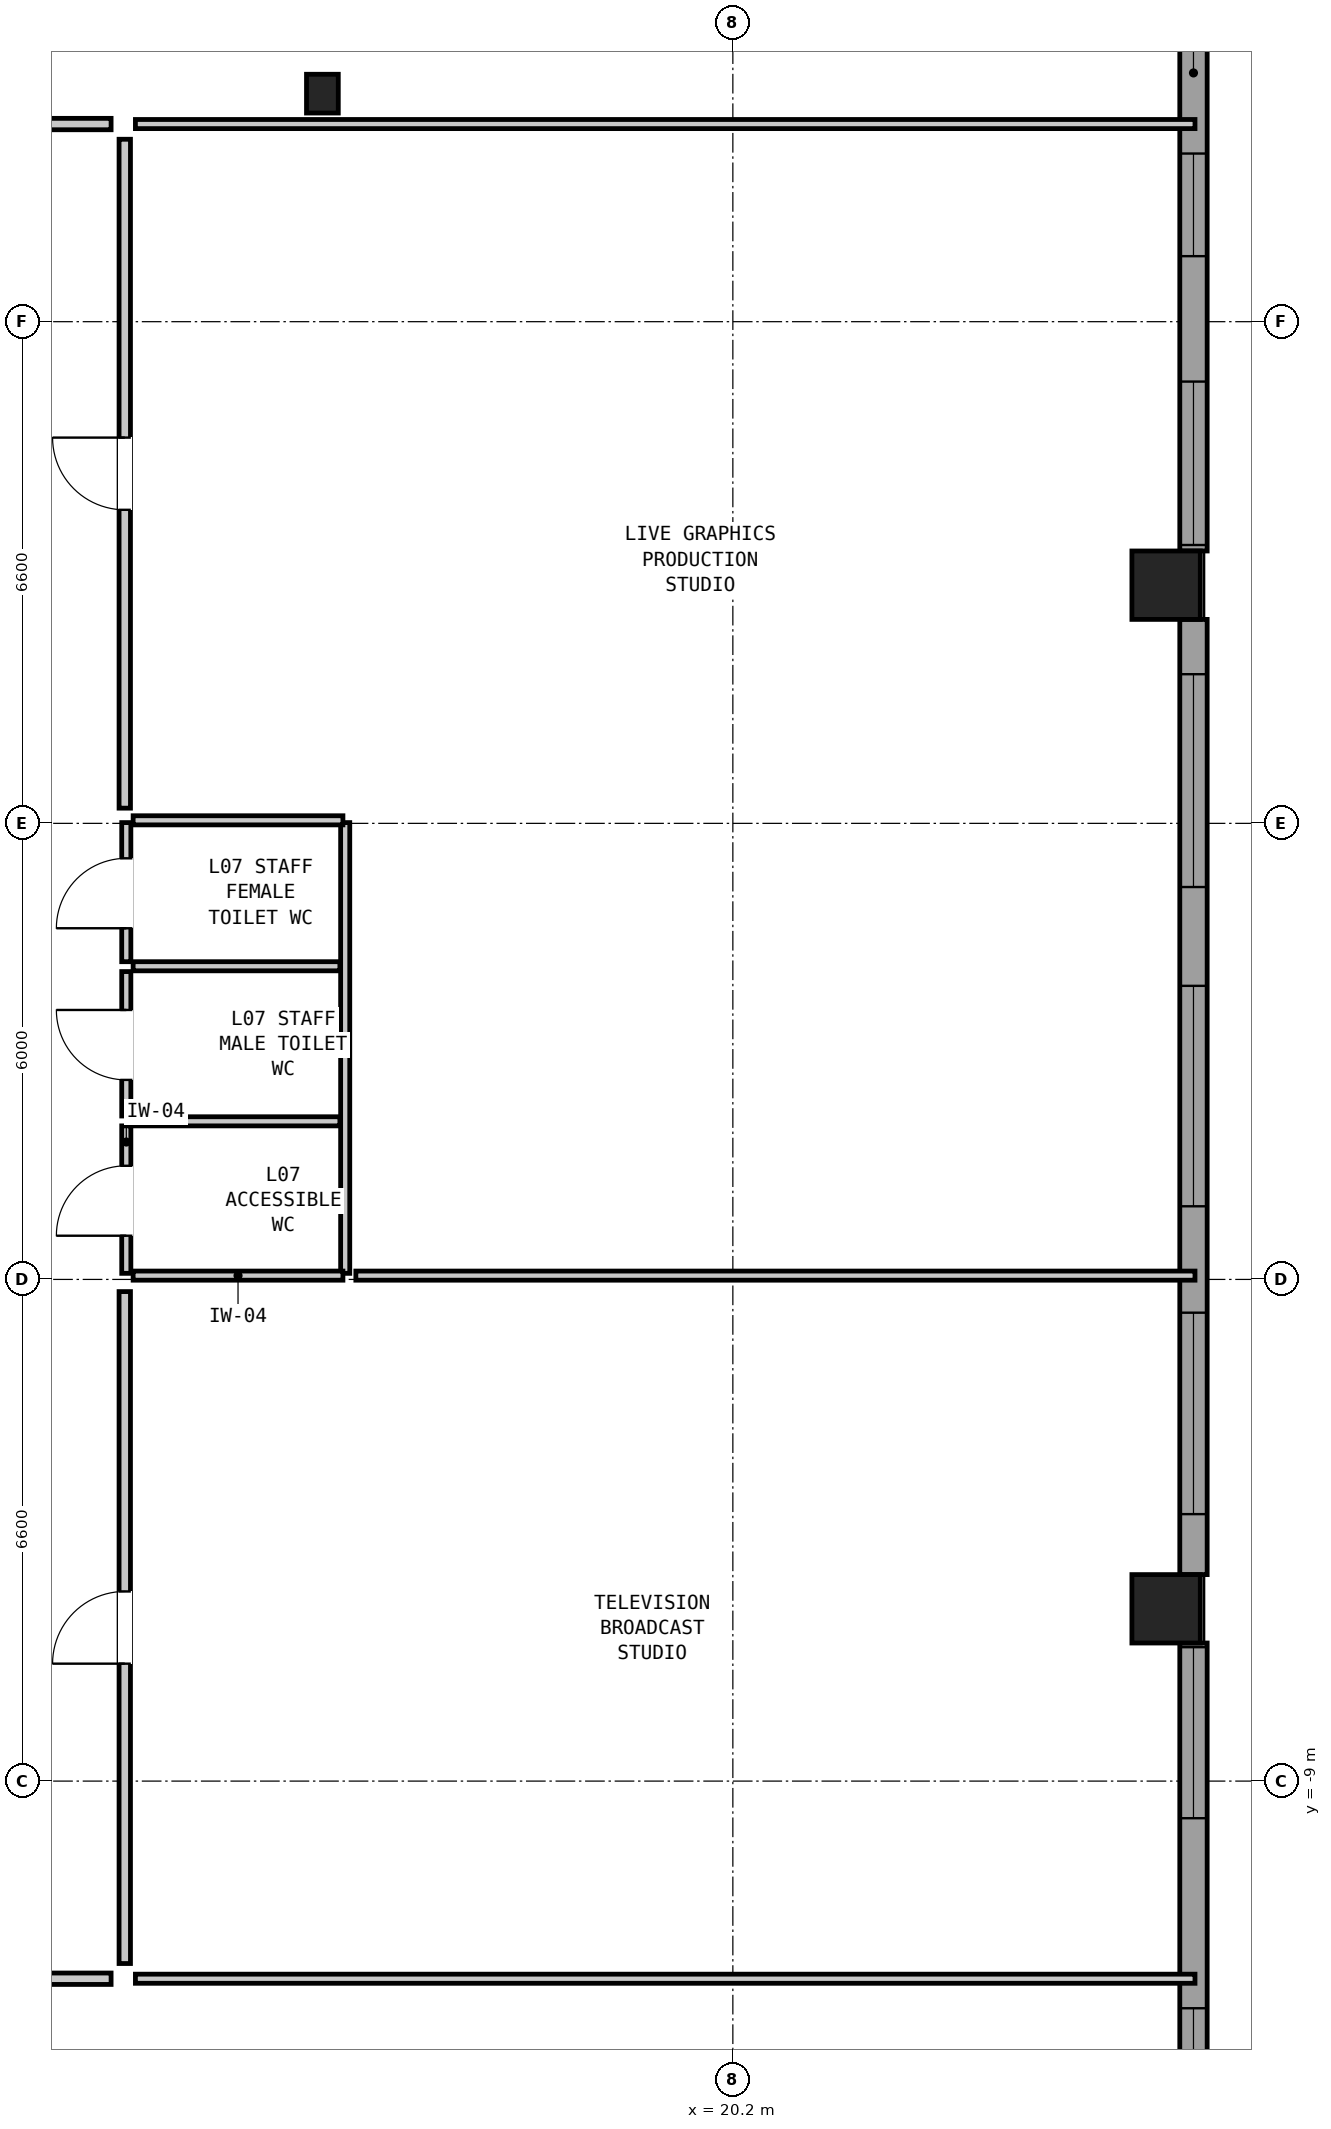
"""IFC4 building model, lengths in metres.
Left out: names, types, materials, properties, quantities, classifications, styles, units other than length and angle.
Written with IfcOpenShell. Run it as: python <this file> out.ifc"""

import sys

from ifc_helpers import new_model, si_unit, direction, frame, frame_2d, origin, origin_2d, place, context, subcontext, project, spatial, rectangle, hollow_rectangle, i_section, extrude, element, fill, save


model = new_model("IFC4")
c1 = context("Model", 3, precision=1e-05, world=origin(), true_north=direction((0.0, 1.0)))
c2 = subcontext(c1, "Body", "Model", "MODEL_VIEW")
j1 = project(units=[si_unit("LENGTHUNIT", "METRE"), si_unit("PLANEANGLEUNIT", "RADIAN")], contexts=[c1])
p1 = place(None, origin())
s1 = spatial("IfcSite", under=j1, at=p1, CompositionType="ELEMENT")
p2 = place(p1, origin())
s2 = spatial("IfcBuilding", under=s1, at=p2, CompositionType="ELEMENT")
p3 = place(p2, frame((0.0, 0.0, 29.15)))
s3 = spatial("IfcBuildingStorey", under=s2, at=p3, CompositionType="ELEMENT", Elevation=29.15)
for number, where, z_axis, x_axis in (
    (1, (25.9, -6.733, 0.0), (0.0, 0.0, 1.0), (0.0, 1.0, 0.0)),
    (2, (25.9, 6.733, 0.0), (0.0, 0.0, 1.0), (0.0, 1.0, 0.0)),
):
    element("IfcColumn", number, at=place(p3, frame(where, z_axis=z_axis, x_axis=x_axis)), inside=s3, PredefinedType="COLUMN", context=c2, shape_type="SweptSolid", body=[
        extrude(hollow_rectangle(XDim=0.9, YDim=0.9, WallThickness=0.055, at=origin_2d()), origin(), (0.0, 0.0, 1.0), 3.05),
    ])
p4 = place(p3, frame((14.8, 13.2, 0.0), z_axis=(0.0, 0.0, 1.0), x_axis=(1.0, 0.0, 0.0)))
e3 = element("IfcColumn", 3, at=p4, inside=s3, PredefinedType="COLUMN", context=c2, shape_type="SweptSolid", body=[
    extrude(i_section(OverallWidth=0.418, OverallDepth=0.51, WebThickness=0.042, FlangeThickness=0.068, at=origin_2d()), origin(), (0.0, 0.0, 1.0), 3.05),
])
p5 = place(p3, frame((26.26, 19.762, 0.0), z_axis=(0.0, 0.0, 1.0), x_axis=(0.0, -1.0, 0.0)))
e4 = element("IfcWall", 4, at=p5, inside=s3, PredefinedType="SOLIDWALL", context=c2, shape_type="SweptSolid", body=[
    extrude(rectangle(XDim=12.579, YDim=0.36, at=frame_2d((6.289, 0.0))), origin(), (0.0, 0.0, 1.0), 2.067),
])
p6 = place(p5, frame((1.8, 0.0, 0.2)))
e5 = element("IfcOpeningElement", 5, at=p6, cuts=e4, PredefinedType="OPENING", context=c2, shape_type="SweptSolid", body=[
    extrude(rectangle(XDim=2.65, YDim=1.05, at=frame_2d((1.325, 0.525))), frame((0.0, 0.192, 0.0), z_axis=(0.0, -1.0, 0.0), x_axis=(1.0, 0.0, 0.0)), (0.0, 0.0, 1.0), 0.384),
])
p7 = place(p5, frame((7.35, 0.0, 0.9)))
e6 = element("IfcOpeningElement", 6, at=p7, cuts=e4, PredefinedType="OPENING", context=c2, shape_type="SweptSolid", body=[
    extrude(rectangle(XDim=1.35, YDim=1.0, at=frame_2d((0.675, 0.5))), frame((0.0, 0.192, 0.0), z_axis=(0.0, -1.0, 0.0), x_axis=(1.0, 0.0, 0.0)), (0.0, 0.0, 1.0), 0.384),
])
p8 = place(p5, frame((10.35, 0.0, 0.2)))
e7 = element("IfcOpeningElement", 7, at=p8, cuts=e4, PredefinedType="OPENING", context=c2, shape_type="SweptSolid", body=[
    extrude(rectangle(XDim=2.15, YDim=1.2, at=frame_2d((1.075, 0.6))), frame((0.0, 0.192, 0.0), z_axis=(0.0, -1.0, 0.0), x_axis=(1.0, 0.0, 0.0)), (0.0, 0.0, 1.0), 0.384),
])
p9 = place(p3, frame((26.26, 6.283, 0.0), z_axis=(0.0, 0.0, 1.0), x_axis=(0.0, -1.0, 0.0)))
e8 = element("IfcWall", 8, at=p9, inside=s3, PredefinedType="SOLIDWALL", context=c2, shape_type="SweptSolid", body=[
    extrude(rectangle(XDim=12.566, YDim=0.36, at=frame_2d((6.283, 0.0))), origin(), (0.0, 0.0, 1.0), 2.067),
])
p10 = place(p9, frame((0.721, 0.0, 0.9)))
e9 = element("IfcOpeningElement", 9, at=p10, cuts=e8, PredefinedType="OPENING", context=c2, shape_type="SweptSolid", body=[
    extrude(rectangle(XDim=2.8, YDim=1.0, at=frame_2d((1.4, 0.5))), frame((0.0, 0.192, 0.0), z_axis=(0.0, -1.0, 0.0), x_axis=(1.0, 0.0, 0.0)), (0.0, 0.0, 1.0), 0.384),
])
p11 = place(p9, frame((4.821, 0.0, 0.2)))
e10 = element("IfcOpeningElement", 10, at=p11, cuts=e8, PredefinedType="OPENING", context=c2, shape_type="SweptSolid", body=[
    extrude(rectangle(XDim=2.9, YDim=0.95, at=frame_2d((1.45, 0.475))), frame((0.0, 0.192, 0.0), z_axis=(0.0, -1.0, 0.0), x_axis=(1.0, 0.0, 0.0)), (0.0, 0.0, 1.0), 0.384),
])
p12 = place(p9, frame((9.121, 0.0, 0.85)))
e11 = element("IfcOpeningElement", 11, at=p12, cuts=e8, PredefinedType="OPENING", context=c2, shape_type="SweptSolid", body=[
    extrude(rectangle(XDim=2.65, YDim=1.05, at=frame_2d((1.325, 0.525))), frame((0.0, 0.192, 0.0), z_axis=(0.0, -1.0, 0.0), x_axis=(1.0, 0.0, 0.0)), (0.0, 0.0, 1.0), 0.384),
])
p13 = place(p3, frame((26.26, -7.183, 0.0), z_axis=(0.0, 0.0, 1.0), x_axis=(0.0, -1.0, 0.0)))
e12 = element("IfcWall", 12, at=p13, inside=s3, PredefinedType="SOLIDWALL", context=c2, shape_type="SweptSolid", body=[
    extrude(rectangle(XDim=12.579, YDim=0.36, at=frame_2d((6.289, 0.0))), origin(), (0.0, 0.0, 1.0), 2.067),
])
p14 = place(p13, frame((0.055, 0.0, 0.2)))
e13 = element("IfcOpeningElement", 13, at=p14, cuts=e12, PredefinedType="OPENING", context=c2, shape_type="SweptSolid", body=[
    extrude(rectangle(XDim=2.25, YDim=1.15, at=frame_2d((1.125, 0.575))), frame((0.0, 0.192, 0.0), z_axis=(0.0, -1.0, 0.0), x_axis=(1.0, 0.0, 0.0)), (0.0, 0.0, 1.0), 0.384),
])
p15 = place(p13, frame((4.805, 0.0, 0.8)))
e14 = element("IfcOpeningElement", 14, at=p15, cuts=e12, PredefinedType="OPENING", context=c2, shape_type="SweptSolid", body=[
    extrude(rectangle(XDim=1.75, YDim=1.1, at=frame_2d((0.875, 0.55))), frame((0.0, 0.192, 0.0), z_axis=(0.0, -1.0, 0.0), x_axis=(1.0, 0.0, 0.0)), (0.0, 0.0, 1.0), 0.384),
])
p16 = place(p13, frame((8.055, 0.0, 0.2)))
e15 = element("IfcOpeningElement", 15, at=p16, cuts=e12, PredefinedType="OPENING", context=c2, shape_type="SweptSolid", body=[
    extrude(rectangle(XDim=2.8, YDim=1.0, at=frame_2d((1.4, 0.5))), frame((0.0, 0.192, 0.0), z_axis=(0.0, -1.0, 0.0), x_axis=(1.0, 0.0, 0.0)), (0.0, 0.0, 1.0), 0.384),
])
p17 = place(p3, frame((12.22, -2.32, 0.0), z_axis=(0.0, 0.0, 1.0), x_axis=(0.0, 1.0, 0.0)))
e16 = element("IfcWall", 16, at=p17, inside=s3, PredefinedType="PARTITIONING", context=c2, shape_type="SweptSolid", body=[
    extrude(rectangle(XDim=1.94, YDim=0.12, at=frame_2d((0.97, 0.0))), origin(), (0.0, 0.0, 1.0), 2.83),
])
p18 = place(p17, frame((0.495, 0.0, 0.0)))
e17 = element("IfcOpeningElement", 17, at=p18, cuts=e16, PredefinedType="OPENING", context=c2, shape_type="SweptSolid", body=[
    extrude(rectangle(XDim=0.92, YDim=2.1, at=frame_2d((0.46, 1.05))), frame((0.0, 0.072, 0.0), z_axis=(0.0, -1.0, 0.0), x_axis=(1.0, 0.0, 0.0)), (0.0, 0.0, 1.0), 0.144),
])
p19 = place(p3, frame((12.22, -0.25, 0.0), z_axis=(0.0, 0.0, 1.0), x_axis=(0.0, 1.0, 0.0)))
e18 = element("IfcWall", 18, at=p19, inside=s3, PredefinedType="PARTITIONING", context=c2, shape_type="SweptSolid", body=[
    extrude(rectangle(XDim=1.9, YDim=0.12, at=frame_2d((0.95, 0.0))), origin(), (0.0, 0.0, 1.0), 2.83),
])
p20 = place(p19, frame((0.475, 0.0, 0.0)))
e19 = element("IfcOpeningElement", 19, at=p20, cuts=e18, PredefinedType="OPENING", context=c2, shape_type="SweptSolid", body=[
    extrude(rectangle(XDim=0.92, YDim=2.1, at=frame_2d((0.46, 1.05))), frame((0.0, 0.072, 0.0), z_axis=(0.0, -1.0, 0.0), x_axis=(1.0, 0.0, 0.0)), (0.0, 0.0, 1.0), 0.144),
])
p21 = place(p3, frame((12.22, 1.78, 0.0), z_axis=(0.0, 0.0, 1.0), x_axis=(0.0, 1.0, 0.0)))
e20 = element("IfcWall", 20, at=p21, inside=s3, PredefinedType="PARTITIONING", context=c2, shape_type="SweptSolid", body=[
    extrude(rectangle(XDim=1.83, YDim=0.12, at=frame_2d((0.915, 0.0))), origin(), (0.0, 0.0, 1.0), 2.83),
])
p22 = place(p21, frame((0.44, 0.0, 0.0)))
e21 = element("IfcOpeningElement", 21, at=p22, cuts=e20, PredefinedType="OPENING", context=c2, shape_type="SweptSolid", body=[
    extrude(rectangle(XDim=0.92, YDim=2.1, at=frame_2d((0.46, 1.05))), frame((0.0, 0.072, 0.0), z_axis=(0.0, -1.0, 0.0), x_axis=(1.0, 0.0, 0.0)), (0.0, 0.0, 1.0), 0.144),
])
p23 = place(p3, frame((15.1, -2.32, 0.0), z_axis=(0.0, 0.0, 1.0), x_axis=(0.0, 1.0, 0.0)))
e22 = element("IfcWall", 22, at=p23, inside=s3, PredefinedType="PARTITIONING", context=c2, shape_type="SweptSolid", body=[
    extrude(rectangle(XDim=5.93, YDim=0.12, at=frame_2d((2.965, 0.0))), origin(), (0.0, 0.0, 1.0), 2.83),
])
for number, where, z_axis, x_axis in (
    (23, (12.31, -2.35, 0.0), (0.0, 0.0, 1.0), (1.0, 0.0, 0.0)),
    (24, (12.31, 3.64, 0.0), (0.0, 0.0, 1.0), (1.0, 0.0, 0.0)),
):
    element("IfcWall", number, at=place(p3, frame(where, z_axis=z_axis, x_axis=x_axis)), inside=s3, PredefinedType="PARTITIONING", context=c2, shape_type="SweptSolid", body=[
        extrude(rectangle(XDim=2.76, YDim=0.12, at=frame_2d((1.38, 0.0))), origin(), (0.0, 0.0, 1.0), 1.799),
    ])
for number, where, z_axis, x_axis in (
    (25, (12.31, -0.32, 0.0), (0.0, 0.0, 1.0), (1.0, 0.0, 0.0)),
    (26, (12.31, 1.72, 0.0), (0.0, 0.0, 1.0), (1.0, 0.0, 0.0)),
):
    element("IfcWall", number, at=place(p3, frame(where, z_axis=z_axis, x_axis=x_axis)), inside=s3, PredefinedType="PARTITIONING", context=c2, shape_type="SweptSolid", body=[
        extrude(rectangle(XDim=2.72, YDim=0.12, at=frame_2d((1.36, 0.0))), origin(), (0.0, 0.0, 1.0), 2.83),
    ])
p24 = place(p3, frame((12.34, 12.8, 0.0), z_axis=(0.0, 0.0, 1.0), x_axis=(1.0, 0.0, 0.0)))
e27 = element("IfcWall", 27, at=p24, inside=s3, PredefinedType="PARTITIONING", context=c2, shape_type="SweptSolid", body=[
    extrude(rectangle(XDim=13.94, YDim=0.12, at=frame_2d((6.97, 0.0))), origin(), (0.0, 0.0, 1.0), 2.83),
])
p25 = place(p3, frame((12.34, -11.6, 0.0), z_axis=(0.0, 0.0, 1.0), x_axis=(1.0, 0.0, 0.0)))
e28 = element("IfcWall", 28, at=p25, inside=s3, PredefinedType="PARTITIONING", context=c2, shape_type="SweptSolid", body=[
    extrude(rectangle(XDim=13.94, YDim=0.12, at=frame_2d((6.97, 0.0))), origin(), (0.0, 0.0, 1.0), 2.274),
])
p26 = place(p3, frame((15.24, -2.35, 0.0), z_axis=(0.0, 0.0, 1.0), x_axis=(1.0, 0.0, 0.0)))
e29 = element("IfcWall", 29, at=p26, inside=s3, PredefinedType="PARTITIONING", context=c2, shape_type="SweptSolid", body=[
    extrude(rectangle(XDim=11.04, YDim=0.12, at=frame_2d((5.52, 0.0))), origin(), (0.0, 0.0, 1.0), 1.799),
])
p27 = place(p3, frame((-3.32, 12.8, 0.0), z_axis=(0.0, 0.0, 1.0), x_axis=(1.0, 0.0, 0.0)))
e30 = element("IfcWall", 30, at=p27, inside=s3, PredefinedType="PARTITIONING", context=c2, shape_type="SweptSolid", body=[
    extrude(rectangle(XDim=15.34, YDim=0.15, at=frame_2d((7.67, 0.0))), origin(), (0.0, 0.0, 1.0), 2.83),
])
p28 = place(p27, frame((7.195, 0.0, 0.0)))
e31 = element("IfcOpeningElement", 31, at=p28, cuts=e30, PredefinedType="OPENING", context=c2, shape_type="SweptSolid", body=[
    extrude(rectangle(XDim=0.95, YDim=2.1, at=frame_2d((0.475, 1.05))), frame((0.0, 0.087, 0.0), z_axis=(0.0, -1.0, 0.0), x_axis=(1.0, 0.0, 0.0)), (0.0, 0.0, 1.0), 0.174),
])
p29 = place(p3, frame((-12.02, -11.6, 0.0), z_axis=(0.0, 0.0, 1.0), x_axis=(1.0, 0.0, 0.0)))
e32 = element("IfcWall", 32, at=p29, inside=s3, PredefinedType="PARTITIONING", context=c2, shape_type="SweptSolid", body=[
    extrude(rectangle(XDim=24.04, YDim=0.15, at=frame_2d((12.02, 0.0))), origin(), (0.0, 0.0, 1.0), 2.274),
])
p30 = place(p29, frame((11.545, 0.0, 0.0)))
e33 = element("IfcOpeningElement", 33, at=p30, cuts=e32, PredefinedType="OPENING", context=c2, shape_type="SweptSolid", body=[
    extrude(rectangle(XDim=0.95, YDim=2.1, at=frame_2d((0.475, 1.05))), frame((0.0, 0.087, 0.0), z_axis=(0.0, -1.0, 0.0), x_axis=(1.0, 0.0, 0.0)), (0.0, 0.0, 1.0), 0.174),
])
p31 = place(p3, frame((12.2, -11.4, 0.0), z_axis=(0.0, 0.0, 1.0), x_axis=(0.0, 1.0, 0.0)))
e34 = element("IfcWall", 34, at=p31, inside=s3, PredefinedType="PARTITIONING", context=c2, shape_type="SweptSolid", body=[
    extrude(rectangle(XDim=8.84, YDim=0.15, at=frame_2d((4.42, 0.0))), origin(), (0.0, 0.0, 1.0), 2.83),
])
p32 = place(p31, frame((3.945, 0.0, 0.0)))
e35 = element("IfcOpeningElement", 35, at=p32, cuts=e34, PredefinedType="OPENING", context=c2, shape_type="SweptSolid", body=[
    extrude(rectangle(XDim=0.95, YDim=2.1, at=frame_2d((0.475, 1.05))), frame((0.0, 0.087, 0.0), z_axis=(0.0, -1.0, 0.0), x_axis=(1.0, 0.0, 0.0)), (0.0, 0.0, 1.0), 0.174),
])
p33 = place(p3, frame((12.2, 3.8, 0.0), z_axis=(0.0, 0.0, 1.0), x_axis=(0.0, 1.0, 0.0)))
e36 = element("IfcWall", 36, at=p33, inside=s3, PredefinedType="PARTITIONING", context=c2, shape_type="SweptSolid", body=[
    extrude(rectangle(XDim=8.8, YDim=0.15, at=frame_2d((4.4, 0.0))), origin(), (0.0, 0.0, 1.0), 2.83),
])
p34 = place(p33, frame((3.925, 0.0, 0.0)))
e37 = element("IfcOpeningElement", 37, at=p34, cuts=e36, PredefinedType="OPENING", context=c2, shape_type="SweptSolid", body=[
    extrude(rectangle(XDim=0.95, YDim=2.1, at=frame_2d((0.475, 1.05))), frame((0.0, 0.087, 0.0), z_axis=(0.0, -1.0, 0.0), x_axis=(1.0, 0.0, 0.0)), (0.0, 0.0, 1.0), 0.174),
])
p35 = place(p7, origin())
e38 = element("IfcWindow", 38, at=p35, inside=s3, PartitioningType="SINGLE_PANEL", PredefinedType="WINDOW", context=c2, shape_type="SweptSolid", body=[
    extrude(rectangle(XDim=1.35, YDim=1.0, at=frame_2d((0.675, 0.5))), frame((0.0, 0.03, 0.0), z_axis=(0.0, -1.0, 0.0), x_axis=(1.0, 0.0, 0.0)), (0.0, 0.0, 1.0), 0.06),
])
fill(e6, e38)
p36 = place(p8, origin())
e39 = element("IfcWindow", 39, at=p36, inside=s3, PartitioningType="SINGLE_PANEL", PredefinedType="WINDOW", context=c2, shape_type="SweptSolid", body=[
    extrude(rectangle(XDim=2.15, YDim=1.2, at=frame_2d((1.075, 0.6))), frame((0.0, 0.03, 0.0), z_axis=(0.0, -1.0, 0.0), x_axis=(1.0, 0.0, 0.0)), (0.0, 0.0, 1.0), 0.06),
])
fill(e7, e39)
p37 = place(p10, origin())
e40 = element("IfcWindow", 40, at=p37, inside=s3, PartitioningType="SINGLE_PANEL", PredefinedType="WINDOW", context=c2, shape_type="SweptSolid", body=[
    extrude(rectangle(XDim=2.8, YDim=1.0, at=frame_2d((1.4, 0.5))), frame((0.0, 0.03, 0.0), z_axis=(0.0, -1.0, 0.0), x_axis=(1.0, 0.0, 0.0)), (0.0, 0.0, 1.0), 0.06),
])
fill(e9, e40)
p38 = place(p11, origin())
e41 = element("IfcWindow", 41, at=p38, inside=s3, PartitioningType="SINGLE_PANEL", PredefinedType="WINDOW", context=c2, shape_type="SweptSolid", body=[
    extrude(rectangle(XDim=2.9, YDim=0.95, at=frame_2d((1.45, 0.475))), frame((0.0, 0.03, 0.0), z_axis=(0.0, -1.0, 0.0), x_axis=(1.0, 0.0, 0.0)), (0.0, 0.0, 1.0), 0.06),
])
fill(e10, e41)
p39 = place(p12, origin())
e42 = element("IfcWindow", 42, at=p39, inside=s3, PartitioningType="SINGLE_PANEL", PredefinedType="WINDOW", context=c2, shape_type="SweptSolid", body=[
    extrude(rectangle(XDim=2.65, YDim=1.05, at=frame_2d((1.325, 0.525))), frame((0.0, 0.03, 0.0), z_axis=(0.0, -1.0, 0.0), x_axis=(1.0, 0.0, 0.0)), (0.0, 0.0, 1.0), 0.06),
])
fill(e11, e42)
p40 = place(p14, origin())
e43 = element("IfcWindow", 43, at=p40, inside=s3, PartitioningType="SINGLE_PANEL", PredefinedType="WINDOW", context=c2, shape_type="SweptSolid", body=[
    extrude(rectangle(XDim=2.25, YDim=1.15, at=frame_2d((1.125, 0.575))), frame((0.0, 0.03, 0.0), z_axis=(0.0, -1.0, 0.0), x_axis=(1.0, 0.0, 0.0)), (0.0, 0.0, 1.0), 0.06),
])
fill(e13, e43)
p41 = place(p15, origin())
e44 = element("IfcWindow", 44, at=p41, inside=s3, PartitioningType="SINGLE_PANEL", PredefinedType="WINDOW", context=c2, shape_type="SweptSolid", body=[
    extrude(rectangle(XDim=1.75, YDim=1.1, at=frame_2d((0.875, 0.55))), frame((0.0, 0.03, 0.0), z_axis=(0.0, -1.0, 0.0), x_axis=(1.0, 0.0, 0.0)), (0.0, 0.0, 1.0), 0.06),
])
fill(e14, e44)
p42 = place(p18, origin())
e45 = element("IfcDoor", 45, at=p42, inside=s3, OperationType="SINGLE_SWING_LEFT", PredefinedType="DOOR", context=c2, shape_type="SweptSolid", body=[
    extrude(rectangle(XDim=0.92, YDim=2.1, at=frame_2d((0.46, 1.05))), frame((0.0, 0.025, 0.0), z_axis=(0.0, -1.0, 0.0), x_axis=(1.0, 0.0, 0.0)), (0.0, 0.0, 1.0), 0.05),
])
fill(e17, e45)
p43 = place(p20, origin())
e46 = element("IfcDoor", 46, at=p43, inside=s3, OperationType="SINGLE_SWING_RIGHT", PredefinedType="DOOR", context=c2, shape_type="SweptSolid", body=[
    extrude(rectangle(XDim=0.92, YDim=2.1, at=frame_2d((0.46, 1.05))), frame((0.0, 0.025, 0.0), z_axis=(0.0, -1.0, 0.0), x_axis=(1.0, 0.0, 0.0)), (0.0, 0.0, 1.0), 0.05),
])
fill(e19, e46)
p44 = place(p22, origin())
e47 = element("IfcDoor", 47, at=p44, inside=s3, OperationType="SINGLE_SWING_LEFT", PredefinedType="DOOR", context=c2, shape_type="SweptSolid", body=[
    extrude(rectangle(XDim=0.92, YDim=2.1, at=frame_2d((0.46, 1.05))), frame((0.0, 0.025, 0.0), z_axis=(0.0, -1.0, 0.0), x_axis=(1.0, 0.0, 0.0)), (0.0, 0.0, 1.0), 0.05),
])
fill(e21, e47)
p45 = place(p32, origin())
e48 = element("IfcDoor", 48, at=p45, inside=s3, OperationType="SINGLE_SWING_LEFT", PredefinedType="DOOR", context=c2, shape_type="SweptSolid", body=[
    extrude(rectangle(XDim=0.95, YDim=2.1, at=frame_2d((0.475, 1.05))), frame((0.0, 0.025, 0.0), z_axis=(0.0, -1.0, 0.0), x_axis=(1.0, 0.0, 0.0)), (0.0, 0.0, 1.0), 0.05),
])
fill(e35, e48)
p46 = place(p34, origin())
e49 = element("IfcDoor", 49, at=p46, inside=s3, OperationType="SINGLE_SWING_RIGHT", PredefinedType="DOOR", context=c2, shape_type="SweptSolid", body=[
    extrude(rectangle(XDim=0.95, YDim=2.1, at=frame_2d((0.475, 1.05))), frame((0.0, 0.025, 0.0), z_axis=(0.0, -1.0, 0.0), x_axis=(1.0, 0.0, 0.0)), (0.0, 0.0, 1.0), 0.05),
])
fill(e37, e49)
save(model, sys.argv[1])
